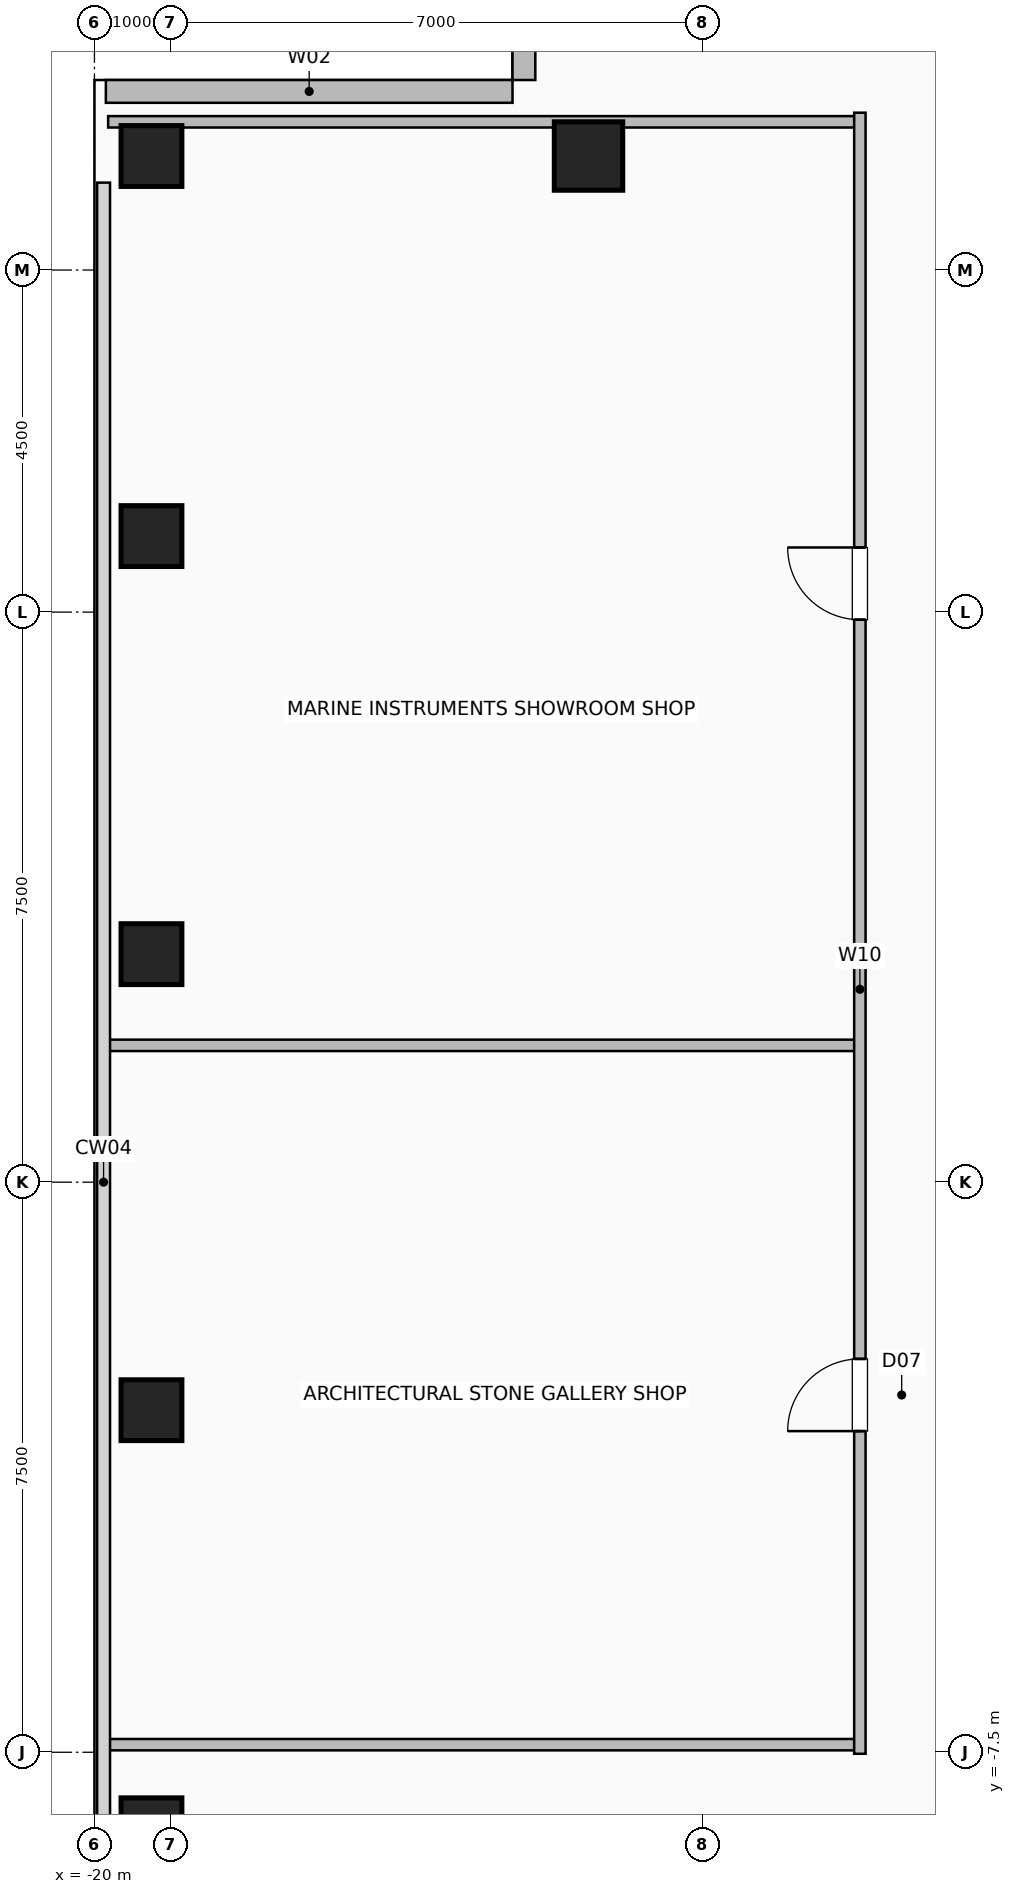
"""IFC4 building model, lengths in metres.
Left out: names, types, materials, properties, quantities, classifications, styles, units other than length and angle.
Written with IfcOpenShell. Run it as: python <this file> out.ifc"""

import sys

from ifc_helpers import new_model, si_unit, direction, frame, frame_2d, origin, origin_2d, place, context, subcontext, project, spatial, rectangle, hollow_rectangle, extrude, element, fill, save


model = new_model("IFC4")
c1 = context("Model", 3, precision=1e-05, world=origin(), true_north=direction((0.0, 1.0)))
c2 = subcontext(c1, "Body", "Model", "MODEL_VIEW")
j1 = project(units=[si_unit("LENGTHUNIT", "METRE"), si_unit("PLANEANGLEUNIT", "RADIAN")], contexts=[c1])
p1 = place(None, origin())
s1 = spatial("IfcSite", under=j1, at=p1, CompositionType="ELEMENT")
p2 = place(p1, origin())
s2 = spatial("IfcBuilding", under=s1, at=p2, CompositionType="ELEMENT")
p3 = place(p2, frame((0.0, 0.0, 220.2)))
s3 = spatial("IfcBuildingStorey", under=s2, at=p3, CompositionType="ELEMENT", Elevation=220.2)
for number, where, z_axis, x_axis in (
    (1, (-19.25, -8.5, 0.0), (0.0, 0.0, 1.0), (1.0, 0.0, 0.0)),
    (2, (-19.25, -3.0, 0.0), (0.0, 0.0, 1.0), (1.0, 0.0, 0.0)),
    (3, (-19.25, 3.0, 0.0), (0.0, 0.0, 1.0), (1.0, 0.0, 0.0)),
    (4, (-19.25, 8.5, 0.0), (0.0, 0.0, 1.0), (1.0, 0.0, 0.0)),
    (5, (-19.25, 13.5, 0.0), (0.0, 0.0, 1.0), (1.0, 0.0, 0.0)),
):
    element("IfcColumn", number, at=place(p3, frame(where, z_axis=z_axis, x_axis=x_axis)), inside=s3, PredefinedType="COLUMN", context=c2, shape_type="SweptSolid", body=[
        extrude(hollow_rectangle(XDim=0.8, YDim=0.8, WallThickness=0.04, at=origin_2d()), origin(), (0.0, 0.0, 1.0), 3.6),
    ])
p4 = place(p3, frame((-13.5, 13.5, 0.0), z_axis=(0.0, 0.0, 1.0), x_axis=(1.0, 0.0, 0.0)))
e6 = element("IfcColumn", 6, at=p4, inside=s3, PredefinedType="COLUMN", context=c2, shape_type="SweptSolid", body=[
    extrude(hollow_rectangle(XDim=0.9, YDim=0.9, WallThickness=0.045, at=origin_2d()), origin(), (0.0, 0.0, 1.0), 3.6),
])
p5 = place(p3, frame((-14.35, 19.85, 0.0), z_axis=(0.0, 0.0, 1.0), x_axis=(0.0, -1.0, 0.0)))
e7 = element("IfcWall", 7, at=p5, inside=s3, PredefinedType="SOLIDWALL", context=c2, shape_type="SweptSolid", body=[
    extrude(rectangle(XDim=5.35, YDim=0.3, at=frame_2d((2.675, 0.0))), origin(), (0.0, 0.0, 1.0), 3.36),
])
p6 = place(p5, frame((1.925, 0.0, 0.9)))
e8 = element("IfcOpeningElement", 8, at=p6, cuts=e7, PredefinedType="OPENING", context=c2, shape_type="SweptSolid", body=[
    extrude(rectangle(XDim=1.5, YDim=1.8, at=frame_2d((0.75, 0.9))), frame((0.0, 0.16, 0.0), z_axis=(0.0, -1.0, 0.0), x_axis=(1.0, 0.0, 0.0)), (0.0, 0.0, 1.0), 0.32),
])
p7 = place(p3, frame((-19.85, 14.35, 0.0), z_axis=(0.0, 0.0, 1.0), x_axis=(1.0, 0.0, 0.0)))
e9 = element("IfcWall", 9, at=p7, inside=s3, PredefinedType="SOLIDWALL", context=c2, shape_type="SweptSolid", body=[
    extrude(rectangle(XDim=5.35, YDim=0.3, at=frame_2d((2.675, 0.0))), origin(), (0.0, 0.0, 1.0), 3.36),
])
for number, where, z_axis, x_axis in (
    (10, (-19.82, -7.4, 0.0), (0.0, 0.0, 1.0), (1.0, 0.0, 0.0)),
    (11, (-19.82, 1.8, 0.0), (0.0, 0.0, 1.0), (1.0, 0.0, 0.0)),
    (12, (-19.82, 13.95, 0.0), (0.0, 0.0, 1.0), (1.0, 0.0, 0.0)),
):
    element("IfcWall", number, at=place(p3, frame(where, z_axis=z_axis, x_axis=x_axis)), inside=s3, PredefinedType="PARTITIONING", context=c2, shape_type="SweptSolid", body=[
        extrude(rectangle(XDim=9.89, YDim=0.15, at=frame_2d((4.945, 0.0))), origin(), (0.0, 0.0, 1.0), 3.36),
    ])
p8 = place(p3, frame((-9.93, -7.52, 0.0), z_axis=(0.0, 0.0, 1.0), x_axis=(0.0, 1.0, 0.0)))
e13 = element("IfcWall", 13, at=p8, inside=s3, PredefinedType="PARTITIONING", context=c2, shape_type="SweptSolid", body=[
    extrude(rectangle(XDim=21.59, YDim=0.15, at=frame_2d((10.795, 0.0))), origin(), (0.0, 0.0, 1.0), 3.36),
])
p9 = place(p8, frame((4.245, 0.0, 0.0)))
e14 = element("IfcOpeningElement", 14, at=p9, cuts=e13, PredefinedType="OPENING", context=c2, shape_type="SweptSolid", body=[
    extrude(rectangle(XDim=0.95, YDim=2.06, at=frame_2d((0.475, 1.03))), frame((0.0, 0.085, 0.0), z_axis=(0.0, -1.0, 0.0), x_axis=(1.0, 0.0, 0.0)), (0.0, 0.0, 1.0), 0.17),
])
p10 = place(p8, frame((14.92, 0.0, 0.0)))
e15 = element("IfcOpeningElement", 15, at=p10, cuts=e13, PredefinedType="OPENING", context=c2, shape_type="SweptSolid", body=[
    extrude(rectangle(XDim=0.95, YDim=2.06, at=frame_2d((0.475, 1.03))), frame((0.0, 0.085, 0.0), z_axis=(0.0, -1.0, 0.0), x_axis=(1.0, 0.0, 0.0)), (0.0, 0.0, 1.0), 0.17),
])
p11 = place(p9, origin())
e16 = element("IfcDoor", 16, at=p11, inside=s3, OperationType="SINGLE_SWING_LEFT", PredefinedType="DOOR", context=c2, shape_type="SweptSolid", body=[
    extrude(rectangle(XDim=0.95, YDim=2.06, at=frame_2d((0.475, 1.03))), frame((0.0, 0.025, 0.0), z_axis=(0.0, -1.0, 0.0), x_axis=(1.0, 0.0, 0.0)), (0.0, 0.0, 1.0), 0.05),
])
fill(e14, e16)
p12 = place(p10, origin())
e17 = element("IfcDoor", 17, at=p12, inside=s3, OperationType="SINGLE_SWING_RIGHT", PredefinedType="DOOR", context=c2, shape_type="SweptSolid", body=[
    extrude(rectangle(XDim=0.95, YDim=2.06, at=frame_2d((0.475, 1.03))), frame((0.0, 0.025, 0.0), z_axis=(0.0, -1.0, 0.0), x_axis=(1.0, 0.0, 0.0)), (0.0, 0.0, 1.0), 0.05),
])
fill(e15, e17)
save(model, sys.argv[1])
